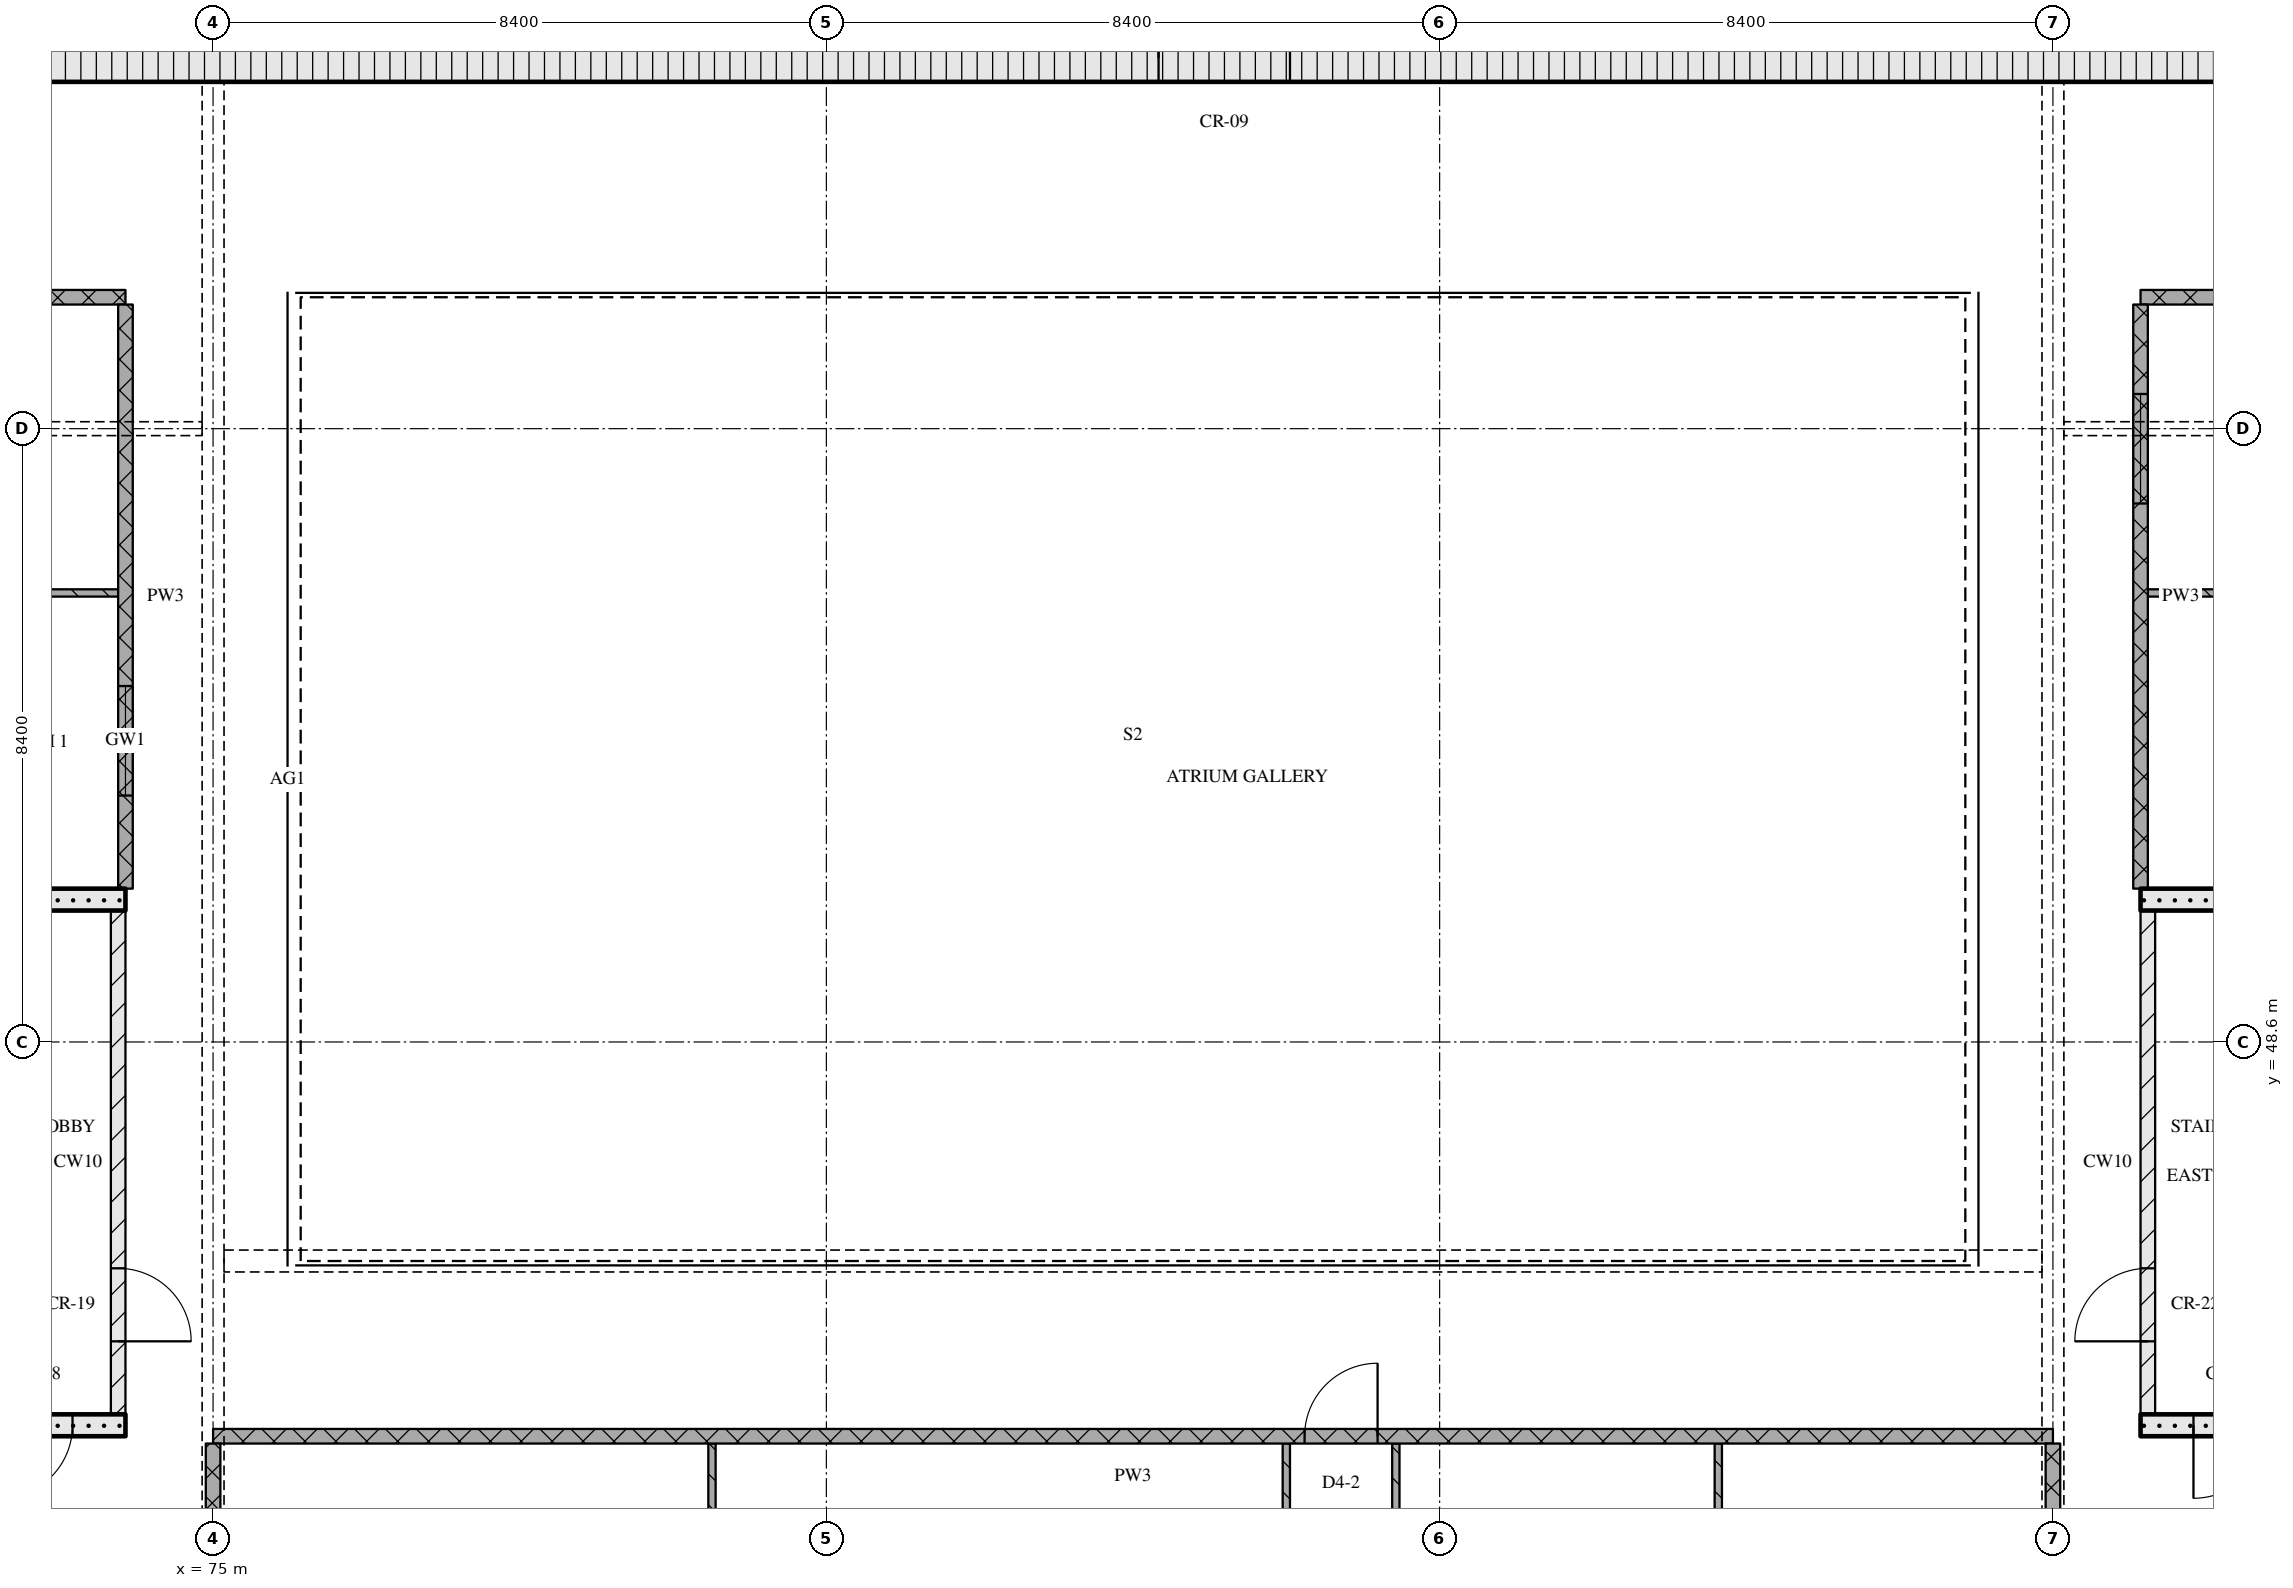
"""IFC4 building model, lengths in metres.
Left out: names, types, materials, properties, quantities, classifications, styles, units other than length and angle.
Written with IfcOpenShell. Run it as: python <this file> out.ifc"""

import sys

from ifc_helpers import new_model, si_unit, direction, frame, frame_2d, origin, place, context, subcontext, project, spatial, rectangle, extrude, element, fill, save


model = new_model("IFC4")
c1 = context("Model", 3, precision=1e-05, world=origin(), true_north=direction((0.0, 1.0)))
c2 = subcontext(c1, "Body", "Model", "MODEL_VIEW")
j1 = project(units=[si_unit("LENGTHUNIT", "METRE"), si_unit("PLANEANGLEUNIT", "RADIAN")], contexts=[c1])
p1 = place(None, origin())
s1 = spatial("IfcSite", under=j1, at=p1, CompositionType="ELEMENT")
p2 = place(p1, origin())
s2 = spatial("IfcBuilding", under=s1, at=p2, CompositionType="ELEMENT")
p3 = place(p2, frame((0.0, 0.0, 245.1)))
s3 = spatial("IfcBuildingStorey", under=s2, at=p3, CompositionType="ELEMENT", Elevation=245.1)
p4 = place(p3, frame((67.15, 62.075, 0.0), z_axis=(0.0, 0.0, 1.0), x_axis=(1.0, 0.0, 0.0)))
e1 = element("IfcWall", 1, at=p4, inside=s3, PredefinedType="SOLIDWALL", context=c2, shape_type="SweptSolid", body=[
    extrude(rectangle(XDim=40.9, YDim=0.65, at=frame_2d((20.45, 0.0))), origin(), (0.0, 0.0, 1.0), 3.32),
])
p5 = place(p4, frame((20.8, 0.0, 0.0)))
e2 = element("IfcOpeningElement", 2, at=p5, cuts=e1, PredefinedType="OPENING", context=c2, shape_type="SweptSolid", body=[
    extrude(rectangle(XDim=1.8, YDim=2.1, at=frame_2d((0.9, 1.05))), frame((0.0, 0.335, 0.0), z_axis=(0.0, -1.0, 0.0), x_axis=(1.0, 0.0, 0.0)), (0.0, 0.0, 1.0), 0.67),
])
p6 = place(p3, frame((68.2, 43.35, 0.0), z_axis=(0.0, 0.0, 1.0), x_axis=(1.0, 0.0, 0.0)))
e3 = element("IfcWall", 3, at=p6, inside=s3, PredefinedType="SOLIDWALL", context=c2, shape_type="SweptSolid", body=[
    extrude(rectangle(XDim=5.6, YDim=0.3, at=frame_2d((2.8, 0.0))), origin(), (0.0, 0.0, 1.0), 3.32),
])
p7 = place(p6, frame((3.875, 0.0, 0.0)))
e4 = element("IfcOpeningElement", 4, at=p7, cuts=e3, PredefinedType="OPENING", context=c2, shape_type="SweptSolid", body=[
    extrude(rectangle(XDim=1.0, YDim=2.1, at=frame_2d((0.5, 1.05))), frame((0.0, 0.16, 0.0), z_axis=(0.0, -1.0, 0.0), x_axis=(1.0, 0.0, 0.0)), (0.0, 0.0, 1.0), 0.32),
])
p8 = place(p3, frame((73.7, 43.5, 0.0), z_axis=(0.0, 0.0, 1.0), x_axis=(0.0, 1.0, 0.0)))
e5 = element("IfcWall", 5, at=p8, inside=s3, PredefinedType="PARTITIONING", context=c2, shape_type="SweptSolid", body=[
    extrude(rectangle(XDim=6.9, YDim=0.2, at=frame_2d((3.45, 0.0))), origin(), (0.0, 0.0, 1.0), 3.32),
])
p9 = place(p8, frame((1.0, 0.0, 0.0)))
e6 = element("IfcOpeningElement", 6, at=p9, cuts=e5, PredefinedType="OPENING", context=c2, shape_type="SweptSolid", body=[
    extrude(rectangle(XDim=1.0, YDim=2.1, at=frame_2d((0.5, 1.05))), frame((0.0, 0.11, 0.0), z_axis=(0.0, -1.0, 0.0), x_axis=(1.0, 0.0, 0.0)), (0.0, 0.0, 1.0), 0.22),
])
p10 = place(p3, frame((68.2, 50.55, 0.0), z_axis=(0.0, 0.0, 1.0), x_axis=(1.0, 0.0, 0.0)))
e7 = element("IfcWall", 7, at=p10, inside=s3, PredefinedType="SOLIDWALL", context=c2, shape_type="SweptSolid", body=[
    extrude(rectangle(XDim=5.6, YDim=0.3, at=frame_2d((2.8, 0.0))), origin(), (0.0, 0.0, 1.0), 3.32),
])
p11 = place(p3, frame((101.4, 43.35, 0.0), z_axis=(0.0, 0.0, 1.0), x_axis=(1.0, 0.0, 0.0)))
e8 = element("IfcWall", 8, at=p11, inside=s3, PredefinedType="SOLIDWALL", context=c2, shape_type="SweptSolid", body=[
    extrude(rectangle(XDim=5.6, YDim=0.3, at=frame_2d((2.8, 0.0))), origin(), (0.0, 0.0, 1.0), 3.32),
])
p12 = place(p11, frame((0.725, 0.0, 0.0)))
e9 = element("IfcOpeningElement", 9, at=p12, cuts=e8, PredefinedType="OPENING", context=c2, shape_type="SweptSolid", body=[
    extrude(rectangle(XDim=1.0, YDim=2.1, at=frame_2d((0.5, 1.05))), frame((0.0, 0.16, 0.0), z_axis=(0.0, -1.0, 0.0), x_axis=(1.0, 0.0, 0.0)), (0.0, 0.0, 1.0), 0.32),
])
p13 = place(p3, frame((101.5, 43.5, 0.0), z_axis=(0.0, 0.0, 1.0), x_axis=(0.0, 1.0, 0.0)))
e10 = element("IfcWall", 10, at=p13, inside=s3, PredefinedType="PARTITIONING", context=c2, shape_type="SweptSolid", body=[
    extrude(rectangle(XDim=6.9, YDim=0.2, at=frame_2d((3.45, 0.0))), origin(), (0.0, 0.0, 1.0), 3.32),
])
p14 = place(p13, frame((1.0, 0.0, 0.0)))
e11 = element("IfcOpeningElement", 11, at=p14, cuts=e10, PredefinedType="OPENING", context=c2, shape_type="SweptSolid", body=[
    extrude(rectangle(XDim=1.0, YDim=2.1, at=frame_2d((0.5, 1.05))), frame((0.0, 0.11, 0.0), z_axis=(0.0, -1.0, 0.0), x_axis=(1.0, 0.0, 0.0)), (0.0, 0.0, 1.0), 0.22),
])
p15 = place(p3, frame((101.4, 50.55, 0.0), z_axis=(0.0, 0.0, 1.0), x_axis=(1.0, 0.0, 0.0)))
e12 = element("IfcWall", 12, at=p15, inside=s3, PredefinedType="SOLIDWALL", context=c2, shape_type="SweptSolid", body=[
    extrude(rectangle(XDim=5.6, YDim=0.3, at=frame_2d((2.8, 0.0))), origin(), (0.0, 0.0, 1.0), 3.32),
])
p16 = place(p3, frame((100.2, 43.2, 0.0), z_axis=(0.0, 0.0, 1.0), x_axis=(-1.0, 0.0, 0.0)))
e13 = element("IfcWall", 13, at=p16, inside=s3, PredefinedType="PARTITIONING", context=c2, shape_type="SweptSolid", body=[
    extrude(rectangle(XDim=25.2, YDim=0.2, at=frame_2d((12.6, 0.0))), origin(), (0.0, 0.0, 1.0), 3.32),
])
p17 = place(p16, frame((9.25, 0.0, 0.0)))
e14 = element("IfcOpeningElement", 14, at=p17, cuts=e13, PredefinedType="OPENING", context=c2, shape_type="SweptSolid", body=[
    extrude(rectangle(XDim=1.0, YDim=2.1, at=frame_2d((0.5, 1.05))), frame((0.0, 0.11, 0.0), z_axis=(0.0, -1.0, 0.0), x_axis=(1.0, 0.0, 0.0)), (0.0, 0.0, 1.0), 0.22),
])
p18 = place(p3, frame((73.7, 54.75, 0.0), z_axis=(0.0, 0.0, 1.0), x_axis=(-1.0, 0.0, 0.0)))
e15 = element("IfcWall", 15, at=p18, inside=s3, PredefinedType="PARTITIONING", context=c2, shape_type="SweptSolid", body=[
    extrude(rectangle(XDim=4.4, YDim=0.1, at=frame_2d((2.2, 0.0))), origin(), (0.0, 0.0, 1.0), 3.32),
])
p19 = place(p18, frame((1.7, 0.0, 0.0)))
e16 = element("IfcOpeningElement", 16, at=p19, cuts=e15, PredefinedType="OPENING", context=c2, shape_type="SweptSolid", body=[
    extrude(rectangle(XDim=0.9, YDim=2.1, at=frame_2d((0.45, 1.05))), frame((0.0, 0.06, 0.0), z_axis=(0.0, -1.0, 0.0), x_axis=(1.0, 0.0, 0.0)), (0.0, 0.0, 1.0), 0.12),
])
p20 = place(p3, frame((101.5, 54.75, 0.0), z_axis=(0.0, 0.0, 1.0), x_axis=(1.0, 0.0, 0.0)))
e17 = element("IfcWall", 17, at=p20, inside=s3, PredefinedType="PARTITIONING", context=c2, shape_type="SweptSolid", body=[
    extrude(rectangle(XDim=5.3, YDim=0.1, at=frame_2d((2.65, 0.0))), origin(), (0.0, 0.0, 1.0), 3.32),
])
p21 = place(p20, frame((2.15, 0.0, 0.0)))
e18 = element("IfcOpeningElement", 18, at=p21, cuts=e17, PredefinedType="OPENING", context=c2, shape_type="SweptSolid", body=[
    extrude(rectangle(XDim=0.9, YDim=2.1, at=frame_2d((0.45, 1.05))), frame((0.0, 0.06, 0.0), z_axis=(0.0, -1.0, 0.0), x_axis=(1.0, 0.0, 0.0)), (0.0, 0.0, 1.0), 0.12),
])
for number, where, z_axis, x_axis in (
    (19, (63.0, 58.8, 0.0), (0.0, 0.0, 1.0), (1.0, 0.0, 0.0)),
    (20, (101.4, 58.8, 0.0), (0.0, 0.0, 1.0), (1.0, 0.0, 0.0)),
):
    element("IfcWall", number, at=place(p3, frame(where, z_axis=z_axis, x_axis=x_axis)), inside=s3, PredefinedType="PARTITIONING", context=c2, shape_type="SweptSolid", body=[
        extrude(rectangle(XDim=10.8, YDim=0.2, at=frame_2d((5.4, 0.0))), origin(), (0.0, 0.0, 1.0), 3.32),
    ])
p22 = place(p3, frame((73.8, 58.7, 0.0), z_axis=(0.0, 0.0, 1.0), x_axis=(0.0, -1.0, 0.0)))
e21 = element("IfcWall", 21, at=p22, inside=s3, PredefinedType="PARTITIONING", context=c2, shape_type="SweptSolid", body=[
    extrude(rectangle(XDim=8.0, YDim=0.2, at=frame_2d((4.0, 0.0))), origin(), (0.0, 0.0, 1.0), 3.32),
])
p23 = place(p22, frame((5.225, 0.0, 0.9)))
e22 = element("IfcOpeningElement", 22, at=p23, cuts=e21, PredefinedType="OPENING", context=c2, shape_type="SweptSolid", body=[
    extrude(rectangle(XDim=1.5, YDim=1.5, at=frame_2d((0.75, 0.75))), frame((0.0, 0.11, 0.0), z_axis=(0.0, -1.0, 0.0), x_axis=(1.0, 0.0, 0.0)), (0.0, 0.0, 1.0), 0.22),
])
p24 = place(p3, frame((75.0, 43.1, 0.0), z_axis=(0.0, 0.0, 1.0), x_axis=(0.0, -1.0, 0.0)))
e23 = element("IfcWall", 23, at=p24, inside=s3, PredefinedType="PARTITIONING", context=c2, shape_type="SweptSolid", body=[
    extrude(rectangle(XDim=2.2, YDim=0.2, at=frame_2d((1.1, 0.0))), origin(), (0.0, 0.0, 1.0), 2.53),
])
for number, where, z_axis, x_axis in (
    (24, (81.833, 43.1, 0.0), (0.0, 0.0, 1.0), (0.0, -1.0, 0.0)),
    (25, (89.7, 43.1, 0.0), (0.0, 0.0, 1.0), (0.0, -1.0, 0.0)),
):
    element("IfcWall", number, at=place(p3, frame(where, z_axis=z_axis, x_axis=x_axis)), inside=s3, PredefinedType="PARTITIONING", context=c2, shape_type="SweptSolid", body=[
        extrude(rectangle(XDim=5.85, YDim=0.1, at=frame_2d((2.925, 0.0))), origin(), (0.0, 0.0, 1.0), 3.32),
    ])
p25 = place(p3, frame((91.2, 43.1, 0.0), z_axis=(0.0, 0.0, 1.0), x_axis=(0.0, -1.0, 0.0)))
e26 = element("IfcWall", 26, at=p25, inside=s3, PredefinedType="PARTITIONING", context=c2, shape_type="SweptSolid", body=[
    extrude(rectangle(XDim=5.85, YDim=0.1, at=frame_2d((2.925, 0.0))), origin(), (0.0, 0.0, 1.0), 3.32),
])
p26 = place(p25, frame((1.75, 0.0, 0.0)))
e27 = element("IfcOpeningElement", 27, at=p26, cuts=e26, PredefinedType="OPENING", context=c2, shape_type="SweptSolid", body=[
    extrude(rectangle(XDim=0.8, YDim=2.1, at=frame_2d((0.4, 1.05))), frame((0.0, 0.06, 0.0), z_axis=(0.0, -1.0, 0.0), x_axis=(1.0, 0.0, 0.0)), (0.0, 0.0, 1.0), 0.12),
])
p27 = place(p3, frame((95.617, 43.1, 0.0), z_axis=(0.0, 0.0, 1.0), x_axis=(0.0, -1.0, 0.0)))
e28 = element("IfcWall", 28, at=p27, inside=s3, PredefinedType="PARTITIONING", context=c2, shape_type="SweptSolid", body=[
    extrude(rectangle(XDim=5.85, YDim=0.1, at=frame_2d((2.925, 0.0))), origin(), (0.0, 0.0, 1.0), 3.32),
])
p28 = place(p3, frame((100.2, 43.1, 0.0), z_axis=(0.0, 0.0, 1.0), x_axis=(0.0, -1.0, 0.0)))
e29 = element("IfcWall", 29, at=p28, inside=s3, PredefinedType="PARTITIONING", context=c2, shape_type="SweptSolid", body=[
    extrude(rectangle(XDim=2.2, YDim=0.2, at=frame_2d((1.1, 0.0))), origin(), (0.0, 0.0, 1.0), 2.53),
])
p29 = place(p3, frame((101.4, 58.7, 0.0), z_axis=(0.0, 0.0, 1.0), x_axis=(0.0, -1.0, 0.0)))
e30 = element("IfcWall", 30, at=p29, inside=s3, PredefinedType="PARTITIONING", context=c2, shape_type="SweptSolid", body=[
    extrude(rectangle(XDim=8.0, YDim=0.2, at=frame_2d((4.0, 0.0))), origin(), (0.0, 0.0, 1.0), 3.32),
])
p30 = place(p29, frame((1.225, 0.0, 0.9)))
e31 = element("IfcOpeningElement", 31, at=p30, cuts=e30, PredefinedType="OPENING", context=c2, shape_type="SweptSolid", body=[
    extrude(rectangle(XDim=1.5, YDim=1.5, at=frame_2d((0.75, 0.75))), frame((0.0, 0.11, 0.0), z_axis=(0.0, -1.0, 0.0), x_axis=(1.0, 0.0, 0.0)), (0.0, 0.0, 1.0), 0.22),
])
p31 = place(p5, origin())
e32 = element("IfcDoor", 32, at=p31, inside=s3, OperationType="DOUBLE_DOOR_SINGLE_SWING", PredefinedType="DOOR", context=c2, shape_type="SweptSolid", body=[
    extrude(rectangle(XDim=1.8, YDim=2.1, at=frame_2d((0.9, 1.05))), frame((0.0, 0.025, 0.0), z_axis=(0.0, -1.0, 0.0), x_axis=(1.0, 0.0, 0.0)), (0.0, 0.0, 1.0), 0.05),
])
fill(e2, e32)
p32 = place(p7, origin())
e33 = element("IfcDoor", 33, at=p32, inside=s3, OperationType="SINGLE_SWING_RIGHT", PredefinedType="DOOR", context=c2, shape_type="SweptSolid", body=[
    extrude(rectangle(XDim=1.0, YDim=2.1, at=frame_2d((0.5, 1.05))), frame((0.0, 0.025, 0.0), z_axis=(0.0, -1.0, 0.0), x_axis=(1.0, 0.0, 0.0)), (0.0, 0.0, 1.0), 0.05),
])
fill(e4, e33)
p33 = place(p9, origin())
e34 = element("IfcDoor", 34, at=p33, inside=s3, OperationType="SINGLE_SWING_RIGHT", PredefinedType="DOOR", context=c2, shape_type="SweptSolid", body=[
    extrude(rectangle(XDim=1.0, YDim=2.1, at=frame_2d((0.5, 1.05))), frame((0.0, 0.025, 0.0), z_axis=(0.0, -1.0, 0.0), x_axis=(1.0, 0.0, 0.0)), (0.0, 0.0, 1.0), 0.05),
])
fill(e6, e34)
p34 = place(p12, origin())
e35 = element("IfcDoor", 35, at=p34, inside=s3, OperationType="SINGLE_SWING_RIGHT", PredefinedType="DOOR", context=c2, shape_type="SweptSolid", body=[
    extrude(rectangle(XDim=1.0, YDim=2.1, at=frame_2d((0.5, 1.05))), frame((0.0, 0.025, 0.0), z_axis=(0.0, -1.0, 0.0), x_axis=(1.0, 0.0, 0.0)), (0.0, 0.0, 1.0), 0.05),
])
fill(e9, e35)
p35 = place(p14, origin())
e36 = element("IfcDoor", 36, at=p35, inside=s3, OperationType="SINGLE_SWING_LEFT", PredefinedType="DOOR", context=c2, shape_type="SweptSolid", body=[
    extrude(rectangle(XDim=1.0, YDim=2.1, at=frame_2d((0.5, 1.05))), frame((0.0, 0.025, 0.0), z_axis=(0.0, -1.0, 0.0), x_axis=(1.0, 0.0, 0.0)), (0.0, 0.0, 1.0), 0.05),
])
fill(e11, e36)
p36 = place(p17, origin())
e37 = element("IfcDoor", 37, at=p36, inside=s3, OperationType="SINGLE_SWING_RIGHT", PredefinedType="DOOR", context=c2, shape_type="SweptSolid", body=[
    extrude(rectangle(XDim=1.0, YDim=2.1, at=frame_2d((0.5, 1.05))), frame((0.0, 0.025, 0.0), z_axis=(0.0, -1.0, 0.0), x_axis=(1.0, 0.0, 0.0)), (0.0, 0.0, 1.0), 0.05),
])
fill(e14, e37)
p37 = place(p23, origin())
e38 = element("IfcWindow", 38, at=p37, inside=s3, PartitioningType="SINGLE_PANEL", PredefinedType="WINDOW", context=c2, shape_type="SweptSolid", body=[
    extrude(rectangle(XDim=1.5, YDim=1.5, at=frame_2d((0.75, 0.75))), frame((0.0, 0.03, 0.0), z_axis=(0.0, -1.0, 0.0), x_axis=(1.0, 0.0, 0.0)), (0.0, 0.0, 1.0), 0.06),
])
fill(e22, e38)
p38 = place(p30, origin())
e39 = element("IfcWindow", 39, at=p38, inside=s3, PartitioningType="SINGLE_PANEL", PredefinedType="WINDOW", context=c2, shape_type="SweptSolid", body=[
    extrude(rectangle(XDim=1.5, YDim=1.5, at=frame_2d((0.75, 0.75))), frame((0.0, 0.03, 0.0), z_axis=(0.0, -1.0, 0.0), x_axis=(1.0, 0.0, 0.0)), (0.0, 0.0, 1.0), 0.06),
])
fill(e31, e39)
save(model, sys.argv[1])
